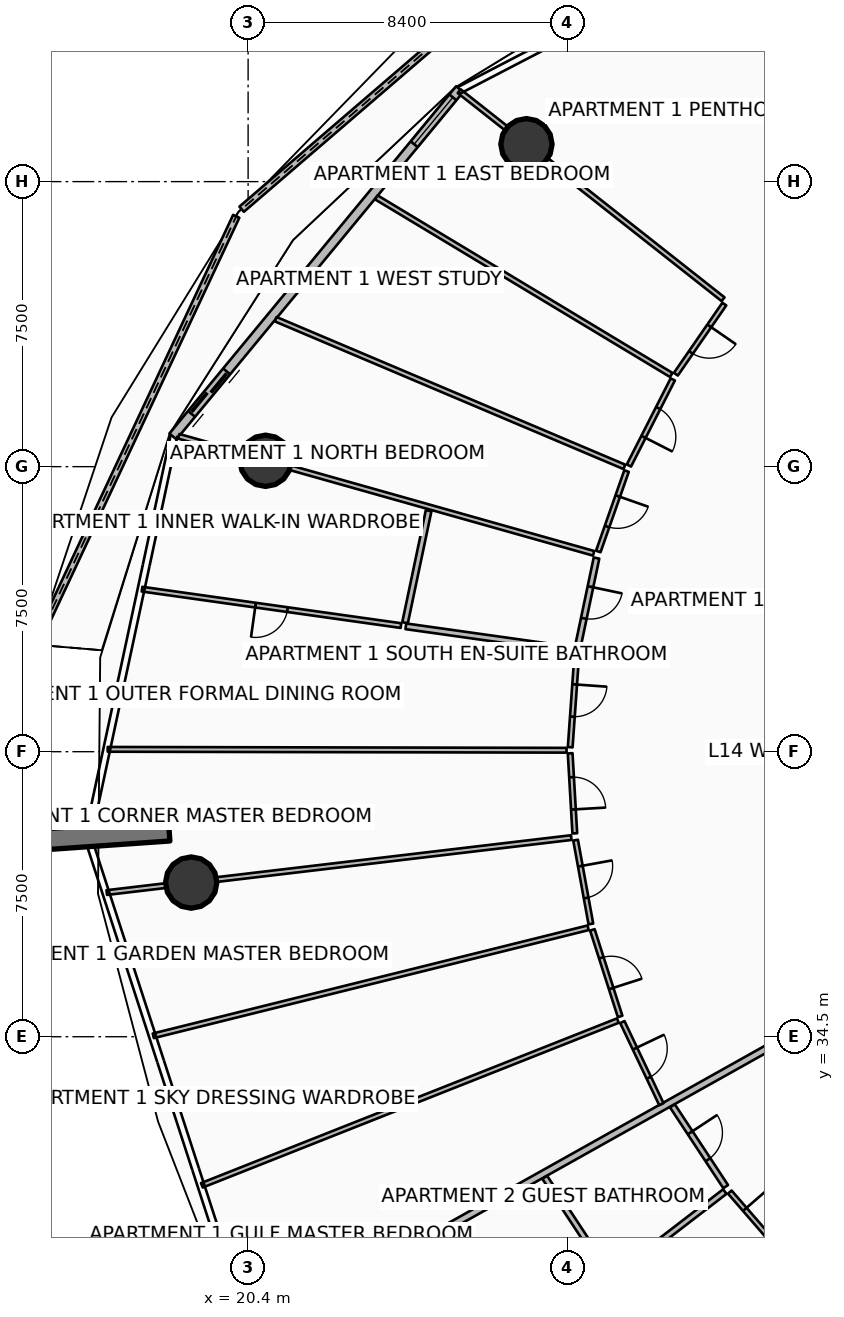
"""IFC4 building model, lengths in metres.
Left out: names, types, materials, properties, quantities, classifications, styles, units other than length and angle.
Written with IfcOpenShell. Run it as: python <this file> out.ifc"""

import sys

from ifc_helpers import new_model, si_unit, direction, frame, frame_2d, origin, origin_2d, place, context, subcontext, project, spatial, polyline, rectangle, circle, outline, extrude, element, fill, save


model = new_model("IFC4")
c1 = context("Model", 3, precision=1e-05, world=origin(), true_north=direction((0.0, 1.0)))
c2 = subcontext(c1, "Body", "Model", "MODEL_VIEW")
j1 = project(units=[si_unit("LENGTHUNIT", "METRE"), si_unit("PLANEANGLEUNIT", "RADIAN")], contexts=[c1])
p1 = place(None, origin())
s1 = spatial("IfcSite", under=j1, at=p1, CompositionType="ELEMENT")
p2 = place(p1, origin())
s2 = spatial("IfcBuilding", under=s1, at=p2, CompositionType="ELEMENT")
p3 = place(p2, frame((0.0, 0.0, 60.15)))
s3 = spatial("IfcBuildingStorey", under=s2, at=p3, CompositionType="ELEMENT", Elevation=60.15)
p4 = place(p3, frame((18.322, 39.925, 0.0), z_axis=(0.0, 0.0, 1.0), x_axis=(-0.997564163539, -0.069754853754, 0.0)))
e1 = element("IfcWall", 1, at=p4, inside=s3, PredefinedType="SOLIDWALL", context=c2, shape_type="SweptSolid", body=[
    extrude(rectangle(XDim=3.5, YDim=0.55, at=frame_2d((1.75, 0.0))), origin(), (0.0, 0.0, 1.0), 3.75),
])
for number, where, z_axis, x_axis in (
    (2, (27.724, 57.984, 0.0), (0.0, 0.0, 1.0), (1.0, 0.0, 0.0)),
    (3, (20.859, 49.655, 0.0), (0.0, 0.0, 1.0), (1.0, 0.0, 0.0)),
    (4, (18.902, 38.556, 0.0), (0.0, 0.0, 1.0), (1.0, 0.0, 0.0)),
):
    element("IfcColumn", number, at=place(p3, frame(where, z_axis=z_axis, x_axis=x_axis)), inside=s3, PredefinedType="COLUMN", context=c2, shape_type="SweptSolid", body=[
        extrude(circle(Radius=0.675, at=origin_2d()), origin(), (0.0, 0.0, 1.0), 3.5),
    ])
p5 = place(p3, frame((29.08, 63.881, 0.0), z_axis=(0.0, 0.0, 1.0), x_axis=(-0.758371329303, -0.651822772609, 0.0)))
e5 = element("IfcWall", 5, at=p5, inside=s3, PredefinedType="PARAPET", context=c2, shape_type="SweptSolid", body=[
    extrude(outline(polyline([(0.0, 0.0), (11.67, 0.0), (11.67, 1.148), (5.835, 1.284), (0.0, 1.483), (0.0, 0.0)])), frame((0.0, 0.09, 0.0), z_axis=(0.0, -1.0, 0.0), x_axis=(1.0, 0.0, 0.0)), (0.0, 0.0, 1.0), 0.18),
])
p6 = place(p3, frame((20.088, 56.087, 0.0), z_axis=(0.0, 0.0, 1.0), x_axis=(-0.424187605295, -0.905574334615, 0.0)))
e6 = element("IfcWall", 6, at=p6, inside=s3, PredefinedType="PARAPET", context=c2, shape_type="SweptSolid", body=[
    extrude(outline(polyline([(0.0, 0.0), (12.446, 0.0), (12.446, 1.224), (6.223, 1.127), (0.0, 1.148), (0.0, 0.0)])), frame((0.0, 0.09, 0.0), z_axis=(0.0, -1.0, 0.0), x_axis=(1.0, 0.0, 0.0)), (0.0, 0.0, 1.0), 0.18),
])
p7 = place(p3, frame((25.967, 59.433, 0.0), z_axis=(0.0, 0.0, 1.0), x_axis=(-0.636674332663, -0.771132799281, 0.0)))
e7 = element("IfcWall", 7, at=p7, inside=s3, PredefinedType="SOLIDWALL", context=c2, shape_type="SweptSolid", body=[
    extrude(rectangle(XDim=11.851, YDim=0.24, at=frame_2d((5.926, 0.0))), origin(), (0.0, 0.0, 1.0), 2.45),
])
p8 = place(p7, frame((9.631, 0.0, 0.0)))
e8 = element("IfcOpeningElement", 8, at=p8, cuts=e7, PredefinedType="OPENING", context=c2, shape_type="SweptSolid", body=[
    extrude(rectangle(XDim=1.45, YDim=2.15, at=frame_2d((0.725, 1.075))), frame((0.0, 0.13, 0.0), z_axis=(0.0, -1.0, 0.0), x_axis=(1.0, 0.0, 0.0)), (0.0, 0.0, 1.0), 0.26),
])
p9 = place(p7, frame((0.28, 0.0, 0.65)))
e9 = element("IfcOpeningElement", 9, at=p9, cuts=e7, PredefinedType="OPENING", context=c2, shape_type="SweptSolid", body=[
    extrude(rectangle(XDim=1.6, YDim=1.5, at=frame_2d((0.8, 0.75))), frame((0.0, 0.13, 0.0), z_axis=(0.0, -1.0, 0.0), x_axis=(1.0, 0.0, 0.0)), (0.0, 0.0, 1.0), 0.26),
])
p10 = place(p3, frame((34.954, 34.694, 0.0), z_axis=(0.0, 0.0, 1.0), x_axis=(-0.872493465611, -0.488625779577, 0.0)))
e10 = element("IfcWall", 10, at=p10, inside=s3, PredefinedType="PARTITIONING", context=c2, shape_type="SweptSolid", body=[
    extrude(rectangle(XDim=16.586, YDim=0.18, at=frame_2d((8.293, 0.0))), origin(), (0.0, 0.0, 1.0), 2.867),
])
p11 = place(p3, frame((32.898, 53.905, 0.0), z_axis=(0.0, 0.0, 1.0), x_axis=(-0.78532854108, 0.619079221558, 0.0)))
e11 = element("IfcWall", 11, at=p11, inside=s3, PredefinedType="PARTITIONING", context=c2, shape_type="SweptSolid", body=[
    extrude(rectangle(XDim=8.842, YDim=0.125, at=frame_2d((4.421, 0.0))), origin(), (0.0, 0.0, 1.0), 2.867),
])
p12 = place(p3, frame((31.534, 51.913, 0.0), z_axis=(0.0, 0.0, 1.0), x_axis=(-0.856706990958, 0.515803384676, 0.0)))
e12 = element("IfcWall", 12, at=p12, inside=s3, PredefinedType="PARTITIONING", context=c2, shape_type="SweptSolid", body=[
    extrude(rectangle(XDim=9.057, YDim=0.125, at=frame_2d((4.528, 0.0))), origin(), (0.0, 0.0, 1.0), 2.94),
])
p13 = place(p3, frame((30.301, 49.494, 0.0), z_axis=(0.0, 0.0, 1.0), x_axis=(-0.920840746031, 0.389938867579, 0.0)))
e13 = element("IfcWall", 13, at=p13, inside=s3, PredefinedType="PARTITIONING", context=c2, shape_type="SweptSolid", body=[
    extrude(rectangle(XDim=9.966, YDim=0.125, at=frame_2d((4.983, 0.0))), origin(), (0.0, 0.0, 1.0), 2.94),
])
p14 = place(p3, frame((32.931, 53.778, 0.0), z_axis=(0.0, 0.0, 1.0), x_axis=(-0.568541738061, -0.822654418382, 0.0)))
e14 = element("IfcWall", 14, at=p14, inside=s3, PredefinedType="PARTITIONING", context=c2, shape_type="SweptSolid", body=[
    extrude(rectangle(XDim=2.242, YDim=0.125, at=frame_2d((1.121, 0.0))), origin(), (0.0, 0.0, 1.0), 2.867),
])
p15 = place(p14, frame((0.696, 0.0, 0.0)))
e15 = element("IfcOpeningElement", 15, at=p15, cuts=e14, PredefinedType="OPENING", context=c2, shape_type="SweptSolid", body=[
    extrude(rectangle(XDim=0.85, YDim=2.06, at=frame_2d((0.425, 1.03))), frame((0.0, 0.073, 0.0), z_axis=(0.0, -1.0, 0.0), x_axis=(1.0, 0.0, 0.0)), (0.0, 0.0, 1.0), 0.145),
])
p16 = place(p3, frame((31.575, 51.796, 0.0), z_axis=(0.0, 0.0, 1.0), x_axis=(-0.454037986735, -0.890982326762, 0.0)))
e16 = element("IfcWall", 16, at=p16, inside=s3, PredefinedType="PARTITIONING", context=c2, shape_type="SweptSolid", body=[
    extrude(rectangle(XDim=2.542, YDim=0.125, at=frame_2d((1.271, 0.0))), origin(), (0.0, 0.0, 1.0), 2.94),
])
p17 = place(p16, frame((0.846, 0.0, 0.0)))
e17 = element("IfcOpeningElement", 17, at=p17, cuts=e16, PredefinedType="OPENING", context=c2, shape_type="SweptSolid", body=[
    extrude(rectangle(XDim=0.85, YDim=2.06, at=frame_2d((0.425, 1.03))), frame((0.0, 0.073, 0.0), z_axis=(0.0, -1.0, 0.0), x_axis=(1.0, 0.0, 0.0)), (0.0, 0.0, 1.0), 0.145),
])
p18 = place(p3, frame((30.358, 49.384, 0.0), z_axis=(0.0, 0.0, 1.0), x_axis=(-0.331344536708, -0.943509829304, 0.0)))
e18 = element("IfcWall", 18, at=p18, inside=s3, PredefinedType="PARTITIONING", context=c2, shape_type="SweptSolid", body=[
    extrude(rectangle(XDim=2.242, YDim=0.125, at=frame_2d((1.121, 0.0))), origin(), (0.0, 0.0, 1.0), 2.867),
])
p19 = place(p18, frame((0.696, 0.0, 0.0)))
e19 = element("IfcOpeningElement", 19, at=p19, cuts=e18, PredefinedType="OPENING", context=c2, shape_type="SweptSolid", body=[
    extrude(rectangle(XDim=0.85, YDim=2.06, at=frame_2d((0.425, 1.03))), frame((0.0, 0.073, 0.0), z_axis=(0.0, -1.0, 0.0), x_axis=(1.0, 0.0, 0.0)), (0.0, 0.0, 1.0), 0.145),
])
p20 = place(p3, frame((29.492, 47.22, 0.0), z_axis=(0.0, 0.0, 1.0), x_axis=(-0.962454721813, 0.271442274635, 0.0)))
e20 = element("IfcWall", 20, at=p20, inside=s3, PredefinedType="PARTITIONING", context=c2, shape_type="SweptSolid", body=[
    extrude(rectangle(XDim=11.344, YDim=0.125, at=frame_2d((5.672, 0.0))), origin(), (0.0, 0.0, 1.0), 2.867),
])
p21 = place(p3, frame((29.568, 47.095, 0.0), z_axis=(0.0, 0.0, 1.0), x_axis=(-0.205861309483, -0.978581177654, 0.0)))
e21 = element("IfcWall", 21, at=p21, inside=s3, PredefinedType="PARTITIONING", context=c2, shape_type="SweptSolid", body=[
    extrude(rectangle(XDim=2.392, YDim=0.15, at=frame_2d((1.196, 0.0))), origin(), (0.0, 0.0, 1.0), 2.867),
])
p22 = place(p21, frame((0.771, 0.0, 0.0)))
e22 = element("IfcOpeningElement", 22, at=p22, cuts=e21, PredefinedType="OPENING", context=c2, shape_type="SweptSolid", body=[
    extrude(rectangle(XDim=0.85, YDim=2.06, at=frame_2d((0.425, 1.03))), frame((0.0, 0.085, 0.0), z_axis=(0.0, -1.0, 0.0), x_axis=(1.0, 0.0, 0.0)), (0.0, 0.0, 1.0), 0.17),
])
p23 = place(p3, frame((25.15, 48.341, 0.0), z_axis=(0.0, 0.0, 1.0), x_axis=(-0.205879759174, -0.978577296264, 0.0)))
e23 = element("IfcWall", 23, at=p23, inside=s3, PredefinedType="PARTITIONING", context=c2, shape_type="SweptSolid", body=[
    extrude(rectangle(XDim=3.012, YDim=0.15, at=frame_2d((1.506, 0.0))), origin(), (0.0, 0.0, 1.0), 2.867),
])
p24 = place(p3, frame((28.968, 44.678, 0.0), z_axis=(0.0, 0.0, 1.0), x_axis=(-0.990240767804, 0.139367219172, 0.0)))
e24 = element("IfcWall", 24, at=p24, inside=s3, PredefinedType="PARTITIONING", context=c2, shape_type="SweptSolid", body=[
    extrude(rectangle(XDim=4.46, YDim=0.15, at=frame_2d((2.23, 0.0))), origin(), (0.0, 0.0, 1.0), 2.94),
])
p25 = place(p3, frame((24.422, 45.318, 0.0), z_axis=(0.0, 0.0, 1.0), x_axis=(-0.990243959665, 0.139344538274, 0.0)))
e25 = element("IfcWall", 25, at=p25, inside=s3, PredefinedType="PARTITIONING", context=c2, shape_type="SweptSolid", body=[
    extrude(rectangle(XDim=6.88, YDim=0.125, at=frame_2d((3.44, 0.0))), origin(), (0.0, 0.0, 1.0), 2.94),
])
p26 = place(p25, frame((3.015, 0.0, 0.0)))
e26 = element("IfcOpeningElement", 26, at=p26, cuts=e25, PredefinedType="OPENING", context=c2, shape_type="SweptSolid", body=[
    extrude(rectangle(XDim=0.85, YDim=2.06, at=frame_2d((0.425, 1.03))), frame((0.0, 0.073, 0.0), z_axis=(0.0, -1.0, 0.0), x_axis=(1.0, 0.0, 0.0)), (0.0, 0.0, 1.0), 0.145),
])
p27 = place(p3, frame((28.78, 42.038, 0.0), z_axis=(0.0, 0.0, 1.0), x_axis=(-0.999998036955, 0.001981435282, 0.0)))
e27 = element("IfcWall", 27, at=p27, inside=s3, PredefinedType="PARTITIONING", context=c2, shape_type="SweptSolid", body=[
    extrude(rectangle(XDim=12.075, YDim=0.125, at=frame_2d((6.038, 0.0))), origin(), (0.0, 0.0, 1.0), 2.94),
])
p28 = place(p3, frame((29.05, 44.576, 0.0), z_axis=(0.0, 0.0, 1.0), x_axis=(-0.070831673661, -0.997488282641, 0.0)))
e28 = element("IfcWall", 28, at=p28, inside=s3, PredefinedType="PARTITIONING", context=c2, shape_type="SweptSolid", body=[
    extrude(rectangle(XDim=2.464, YDim=0.125, at=frame_2d((1.232, 0.0))), origin(), (0.0, 0.0, 1.0), 2.94),
])
p29 = place(p28, frame((0.807, 0.0, 0.0)))
e29 = element("IfcOpeningElement", 29, at=p29, cuts=e28, PredefinedType="OPENING", context=c2, shape_type="SweptSolid", body=[
    extrude(rectangle(XDim=0.85, YDim=2.06, at=frame_2d((0.425, 1.03))), frame((0.0, 0.073, 0.0), z_axis=(0.0, -1.0, 0.0), x_axis=(1.0, 0.0, 0.0)), (0.0, 0.0, 1.0), 0.145),
])
p30 = place(p3, frame((28.875, 41.958, 0.0), z_axis=(0.0, 0.0, 1.0), x_axis=(0.057962417622, -0.998318765797, 0.0)))
e30 = element("IfcWall", 30, at=p30, inside=s3, PredefinedType="PARTITIONING", context=c2, shape_type="SweptSolid", body=[
    extrude(rectangle(XDim=2.11, YDim=0.125, at=frame_2d((1.055, 0.0))), origin(), (0.0, 0.0, 1.0), 2.867),
])
p31 = place(p30, frame((0.63, 0.0, 0.0)))
e31 = element("IfcOpeningElement", 31, at=p31, cuts=e30, PredefinedType="OPENING", context=c2, shape_type="SweptSolid", body=[
    extrude(rectangle(XDim=0.85, YDim=2.06, at=frame_2d((0.425, 1.03))), frame((0.0, 0.073, 0.0), z_axis=(0.0, -1.0, 0.0), x_axis=(1.0, 0.0, 0.0)), (0.0, 0.0, 1.0), 0.145),
])
p32 = place(p3, frame((28.903, 39.74, 0.0), z_axis=(0.0, 0.0, 1.0), x_axis=(-0.993068040113, -0.117540919282, 0.0)))
e32 = element("IfcWall", 32, at=p32, inside=s3, PredefinedType="PARTITIONING", context=c2, shape_type="SweptSolid", body=[
    extrude(rectangle(XDim=12.309, YDim=0.125, at=frame_2d((6.154, 0.0))), origin(), (0.0, 0.0, 1.0), 2.867),
])
p33 = place(p3, frame((29.347, 37.366, 0.0), z_axis=(0.0, 0.0, 1.0), x_axis=(-0.970510462135, -0.241059002917, 0.0)))
e33 = element("IfcWall", 33, at=p33, inside=s3, PredefinedType="PARTITIONING", context=c2, shape_type="SweptSolid", body=[
    extrude(rectangle(XDim=11.79, YDim=0.125, at=frame_2d((5.895, 0.0))), origin(), (0.0, 0.0, 1.0), 2.94),
])
p34 = place(p3, frame((30.13, 34.925, 0.0), z_axis=(0.0, 0.0, 1.0), x_axis=(-0.929770978957, -0.368138461302, 0.0)))
e34 = element("IfcWall", 34, at=p34, inside=s3, PredefinedType="PARTITIONING", context=c2, shape_type="SweptSolid", body=[
    extrude(rectangle(XDim=11.773, YDim=0.125, at=frame_2d((5.887, 0.0))), origin(), (0.0, 0.0, 1.0), 2.94),
])
p35 = place(p3, frame((29.017, 39.673, 0.0), z_axis=(0.0, 0.0, 1.0), x_axis=(0.179632658462, -0.983733758704, 0.0)))
e35 = element("IfcWall", 35, at=p35, inside=s3, PredefinedType="PARTITIONING", context=c2, shape_type="SweptSolid", body=[
    extrude(rectangle(XDim=2.242, YDim=0.125, at=frame_2d((1.121, 0.0))), origin(), (0.0, 0.0, 1.0), 2.867),
])
p36 = place(p35, frame((0.696, 0.0, 0.0)))
e36 = element("IfcOpeningElement", 36, at=p36, cuts=e35, PredefinedType="OPENING", context=c2, shape_type="SweptSolid", body=[
    extrude(rectangle(XDim=0.85, YDim=2.06, at=frame_2d((0.425, 1.03))), frame((0.0, 0.073, 0.0), z_axis=(0.0, -1.0, 0.0), x_axis=(1.0, 0.0, 0.0)), (0.0, 0.0, 1.0), 0.145),
])
p37 = place(p3, frame((29.458, 37.312, 0.0), z_axis=(0.0, 0.0, 1.0), x_axis=(0.305338513131, -0.952243872335, 0.0)))
e37 = element("IfcWall", 37, at=p37, inside=s3, PredefinedType="PARTITIONING", context=c2, shape_type="SweptSolid", body=[
    extrude(rectangle(XDim=2.392, YDim=0.125, at=frame_2d((1.196, 0.0))), origin(), (0.0, 0.0, 1.0), 2.94),
])
p38 = place(p37, frame((0.771, 0.0, 0.0)))
e38 = element("IfcOpeningElement", 38, at=p38, cuts=e37, PredefinedType="OPENING", context=c2, shape_type="SweptSolid", body=[
    extrude(rectangle(XDim=0.85, YDim=2.06, at=frame_2d((0.425, 1.03))), frame((0.0, 0.073, 0.0), z_axis=(0.0, -1.0, 0.0), x_axis=(1.0, 0.0, 0.0)), (0.0, 0.0, 1.0), 0.145),
])
p39 = place(p3, frame((30.248, 34.885, 0.0), z_axis=(0.0, 0.0, 1.0), x_axis=(0.429366977128, -0.903130111862, 0.0)))
e39 = element("IfcWall", 39, at=p39, inside=s3, PredefinedType="PARTITIONING", context=c2, shape_type="SweptSolid", body=[
    extrude(rectangle(XDim=2.392, YDim=0.125, at=frame_2d((1.196, 0.0))), origin(), (0.0, 0.0, 1.0), 2.867),
])
p40 = place(p39, frame((0.771, 0.0, 0.0)))
e40 = element("IfcOpeningElement", 40, at=p40, cuts=e39, PredefinedType="OPENING", context=c2, shape_type="SweptSolid", body=[
    extrude(rectangle(XDim=0.85, YDim=2.06, at=frame_2d((0.425, 1.03))), frame((0.0, 0.073, 0.0), z_axis=(0.0, -1.0, 0.0), x_axis=(1.0, 0.0, 0.0)), (0.0, 0.0, 1.0), 0.145),
])
p41 = place(p3, frame((31.565, 32.682, 0.0), z_axis=(0.0, 0.0, 1.0), x_axis=(0.550533618108, -0.834812994229, 0.0)))
e41 = element("IfcWall", 41, at=p41, inside=s3, PredefinedType="PARTITIONING", context=c2, shape_type="SweptSolid", body=[
    extrude(rectangle(XDim=2.546, YDim=0.15, at=frame_2d((1.273, 0.0))), origin(), (0.0, 0.0, 1.0), 2.867),
])
p42 = place(p41, frame((0.848, 0.0, 0.0)))
e42 = element("IfcOpeningElement", 42, at=p42, cuts=e41, PredefinedType="OPENING", context=c2, shape_type="SweptSolid", body=[
    extrude(rectangle(XDim=0.85, YDim=2.06, at=frame_2d((0.425, 1.03))), frame((0.0, 0.085, 0.0), z_axis=(0.0, -1.0, 0.0), x_axis=(1.0, 0.0, 0.0)), (0.0, 0.0, 1.0), 0.17),
])
p43 = place(p3, frame((28.206, 30.8, 0.0), z_axis=(0.0, 0.0, 1.0), x_axis=(0.550481610401, -0.834847289395, 0.0)))
e43 = element("IfcWall", 43, at=p43, inside=s3, PredefinedType="PARTITIONING", context=c2, shape_type="SweptSolid", body=[
    extrude(rectangle(XDim=3.104, YDim=0.15, at=frame_2d((1.552, 0.0))), origin(), (0.0, 0.0, 1.0), 2.867),
])
p44 = place(p3, frame((32.945, 30.426, 0.0), z_axis=(0.0, 0.0, 1.0), x_axis=(-0.79279229966, -0.609491894614, 0.0)))
e44 = element("IfcWall", 44, at=p44, inside=s3, PredefinedType="PARTITIONING", context=c2, shape_type="SweptSolid", body=[
    extrude(rectangle(XDim=3.72, YDim=0.15, at=frame_2d((1.86, 0.0))), origin(), (0.0, 0.0, 1.0), 2.94),
])
p45 = place(p3, frame((33.075, 30.413, 0.0), z_axis=(0.0, 0.0, 1.0), x_axis=(0.655021066846, -0.755610615322, 0.0)))
e45 = element("IfcWall", 45, at=p45, inside=s3, PredefinedType="PARTITIONING", context=c2, shape_type="SweptSolid", body=[
    extrude(rectangle(XDim=2.053, YDim=0.125, at=frame_2d((1.027, 0.0))), origin(), (0.0, 0.0, 1.0), 2.94),
])
p46 = place(p45, frame((0.602, 0.0, 0.0)))
e46 = element("IfcOpeningElement", 46, at=p46, cuts=e45, PredefinedType="OPENING", context=c2, shape_type="SweptSolid", body=[
    extrude(rectangle(XDim=0.85, YDim=2.06, at=frame_2d((0.425, 1.03))), frame((0.0, 0.073, 0.0), z_axis=(0.0, -1.0, 0.0), x_axis=(1.0, 0.0, 0.0)), (0.0, 0.0, 1.0), 0.145),
])
p47 = place(p8, origin())
e47 = element("IfcDoor", 47, at=p47, inside=s3, OperationType="DOUBLE_DOOR_SLIDING", PredefinedType="DOOR", context=c2, shape_type="SweptSolid", body=[
    extrude(rectangle(XDim=1.45, YDim=2.15, at=frame_2d((0.725, 1.075))), frame((0.0, 0.025, 0.0), z_axis=(0.0, -1.0, 0.0), x_axis=(1.0, 0.0, 0.0)), (0.0, 0.0, 1.0), 0.05),
])
fill(e8, e47)
p48 = place(p9, origin())
e48 = element("IfcWindow", 48, at=p48, inside=s3, PartitioningType="SINGLE_PANEL", PredefinedType="WINDOW", context=c2, shape_type="SweptSolid", body=[
    extrude(rectangle(XDim=1.6, YDim=1.5, at=frame_2d((0.8, 0.75))), frame((0.0, 0.03, 0.0), z_axis=(0.0, -1.0, 0.0), x_axis=(1.0, 0.0, 0.0)), (0.0, 0.0, 1.0), 0.06),
])
fill(e9, e48)
p49 = place(p15, origin())
e49 = element("IfcDoor", 49, at=p49, inside=s3, OperationType="SINGLE_SWING_LEFT", PredefinedType="DOOR", context=c2, shape_type="SweptSolid", body=[
    extrude(rectangle(XDim=0.85, YDim=2.06, at=frame_2d((0.425, 1.03))), frame((0.0, 0.025, 0.0), z_axis=(0.0, -1.0, 0.0), x_axis=(1.0, 0.0, 0.0)), (0.0, 0.0, 1.0), 0.05),
])
fill(e15, e49)
p50 = place(p17, origin())
e50 = element("IfcDoor", 50, at=p50, inside=s3, OperationType="SINGLE_SWING_RIGHT", PredefinedType="DOOR", context=c2, shape_type="SweptSolid", body=[
    extrude(rectangle(XDim=0.85, YDim=2.06, at=frame_2d((0.425, 1.03))), frame((0.0, 0.025, 0.0), z_axis=(0.0, -1.0, 0.0), x_axis=(1.0, 0.0, 0.0)), (0.0, 0.0, 1.0), 0.05),
])
fill(e17, e50)
p51 = place(p19, origin())
e51 = element("IfcDoor", 51, at=p51, inside=s3, OperationType="SINGLE_SWING_LEFT", PredefinedType="DOOR", context=c2, shape_type="SweptSolid", body=[
    extrude(rectangle(XDim=0.85, YDim=2.06, at=frame_2d((0.425, 1.03))), frame((0.0, 0.025, 0.0), z_axis=(0.0, -1.0, 0.0), x_axis=(1.0, 0.0, 0.0)), (0.0, 0.0, 1.0), 0.05),
])
fill(e19, e51)
p52 = place(p22, origin())
e52 = element("IfcDoor", 52, at=p52, inside=s3, OperationType="SINGLE_SWING_LEFT", PredefinedType="DOOR", context=c2, shape_type="SweptSolid", body=[
    extrude(rectangle(XDim=0.85, YDim=2.06, at=frame_2d((0.425, 1.03))), frame((0.0, 0.025, 0.0), z_axis=(0.0, -1.0, 0.0), x_axis=(1.0, 0.0, 0.0)), (0.0, 0.0, 1.0), 0.05),
])
fill(e22, e52)
p53 = place(p26, origin())
e53 = element("IfcDoor", 53, at=p53, inside=s3, OperationType="SINGLE_SWING_RIGHT", PredefinedType="DOOR", context=c2, shape_type="SweptSolid", body=[
    extrude(rectangle(XDim=0.85, YDim=2.06, at=frame_2d((0.425, 1.03))), frame((0.0, 0.025, 0.0), z_axis=(0.0, -1.0, 0.0), x_axis=(1.0, 0.0, 0.0)), (0.0, 0.0, 1.0), 0.05),
])
fill(e26, e53)
p54 = place(p29, origin())
e54 = element("IfcDoor", 54, at=p54, inside=s3, OperationType="SINGLE_SWING_LEFT", PredefinedType="DOOR", context=c2, shape_type="SweptSolid", body=[
    extrude(rectangle(XDim=0.85, YDim=2.06, at=frame_2d((0.425, 1.03))), frame((0.0, 0.025, 0.0), z_axis=(0.0, -1.0, 0.0), x_axis=(1.0, 0.0, 0.0)), (0.0, 0.0, 1.0), 0.05),
])
fill(e29, e54)
p55 = place(p31, origin())
e55 = element("IfcDoor", 55, at=p55, inside=s3, OperationType="SINGLE_SWING_RIGHT", PredefinedType="DOOR", context=c2, shape_type="SweptSolid", body=[
    extrude(rectangle(XDim=0.85, YDim=2.06, at=frame_2d((0.425, 1.03))), frame((0.0, 0.025, 0.0), z_axis=(0.0, -1.0, 0.0), x_axis=(1.0, 0.0, 0.0)), (0.0, 0.0, 1.0), 0.05),
])
fill(e31, e55)
p56 = place(p36, origin())
e56 = element("IfcDoor", 56, at=p56, inside=s3, OperationType="SINGLE_SWING_LEFT", PredefinedType="DOOR", context=c2, shape_type="SweptSolid", body=[
    extrude(rectangle(XDim=0.85, YDim=2.06, at=frame_2d((0.425, 1.03))), frame((0.0, 0.025, 0.0), z_axis=(0.0, -1.0, 0.0), x_axis=(1.0, 0.0, 0.0)), (0.0, 0.0, 1.0), 0.05),
])
fill(e36, e56)
p57 = place(p38, origin())
e57 = element("IfcDoor", 57, at=p57, inside=s3, OperationType="SINGLE_SWING_RIGHT", PredefinedType="DOOR", context=c2, shape_type="SweptSolid", body=[
    extrude(rectangle(XDim=0.85, YDim=2.06, at=frame_2d((0.425, 1.03))), frame((0.0, 0.025, 0.0), z_axis=(0.0, -1.0, 0.0), x_axis=(1.0, 0.0, 0.0)), (0.0, 0.0, 1.0), 0.05),
])
fill(e38, e57)
p58 = place(p40, origin())
e58 = element("IfcDoor", 58, at=p58, inside=s3, OperationType="SINGLE_SWING_LEFT", PredefinedType="DOOR", context=c2, shape_type="SweptSolid", body=[
    extrude(rectangle(XDim=0.85, YDim=2.06, at=frame_2d((0.425, 1.03))), frame((0.0, 0.025, 0.0), z_axis=(0.0, -1.0, 0.0), x_axis=(1.0, 0.0, 0.0)), (0.0, 0.0, 1.0), 0.05),
])
fill(e40, e58)
p59 = place(p42, origin())
e59 = element("IfcDoor", 59, at=p59, inside=s3, OperationType="SINGLE_SWING_LEFT", PredefinedType="DOOR", context=c2, shape_type="SweptSolid", body=[
    extrude(rectangle(XDim=0.85, YDim=2.06, at=frame_2d((0.425, 1.03))), frame((0.0, 0.025, 0.0), z_axis=(0.0, -1.0, 0.0), x_axis=(1.0, 0.0, 0.0)), (0.0, 0.0, 1.0), 0.05),
])
fill(e42, e59)
p60 = place(p46, origin())
e60 = element("IfcDoor", 60, at=p60, inside=s3, OperationType="SINGLE_SWING_LEFT", PredefinedType="DOOR", context=c2, shape_type="SweptSolid", body=[
    extrude(rectangle(XDim=0.85, YDim=2.06, at=frame_2d((0.425, 1.03))), frame((0.0, 0.025, 0.0), z_axis=(0.0, -1.0, 0.0), x_axis=(1.0, 0.0, 0.0)), (0.0, 0.0, 1.0), 0.05),
])
fill(e46, e60)
save(model, sys.argv[1])
